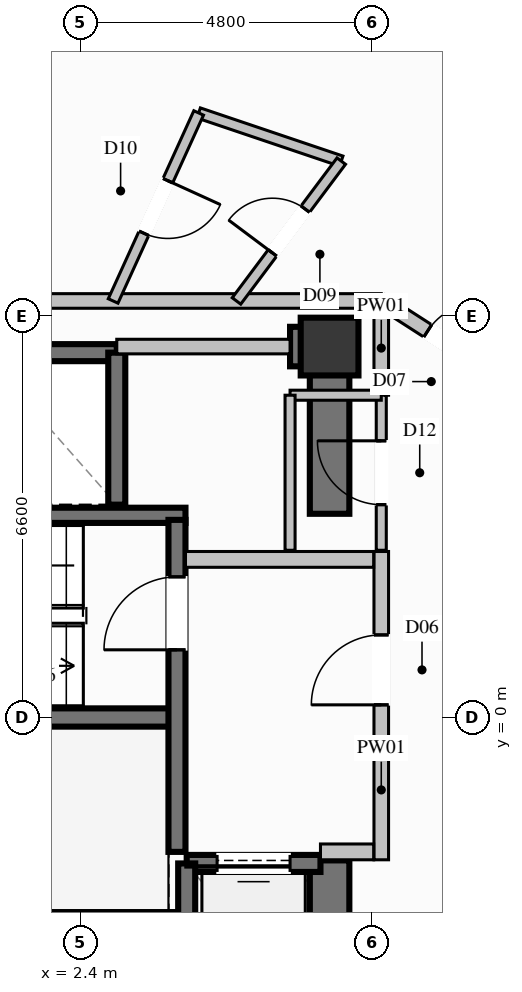
"""IFC4 building model, lengths in metres.
Left out: names, types, materials, properties, quantities, classifications, styles, units other than length and angle.
Written with IfcOpenShell. Run it as: python <this file> out.ifc"""

import sys

from ifc_helpers import new_model, si_unit, direction, frame, frame_2d, origin, origin_2d, place, context, subcontext, project, spatial, rectangle, extrude, element, fill, save


model = new_model("IFC4")
c1 = context("Model", 3, precision=1e-05, world=origin(), true_north=direction((0.0, 1.0)))
c2 = subcontext(c1, "Body", "Model", "MODEL_VIEW")
j1 = project(units=[si_unit("LENGTHUNIT", "METRE"), si_unit("PLANEANGLEUNIT", "RADIAN")], contexts=[c1])
p1 = place(None, origin())
s1 = spatial("IfcSite", under=j1, at=p1, CompositionType="ELEMENT")
p2 = place(p1, origin())
s2 = spatial("IfcBuilding", under=s1, at=p2, CompositionType="ELEMENT")
p3 = place(p2, frame((0.0, 0.0, 127.8)))
s3 = spatial("IfcBuildingStorey", under=s2, at=p3, CompositionType="ELEMENT", Elevation=127.8)
p4 = place(p3, frame((6.5, 6.1, 0.0), z_axis=(0.0, 0.0, 1.0), x_axis=(1.0, 0.0, 0.0)))
e1 = element("IfcColumn", 1, at=p4, inside=s3, PredefinedType="COLUMN", context=c2, shape_type="SweptSolid", body=[
    extrude(rectangle(XDim=0.95, YDim=0.95, at=origin_2d()), origin(), (0.0, 0.0, 1.0), 3.6),
])
p5 = place(p3, frame((-3.99, 0.0, 0.0), z_axis=(0.0, 0.0, 1.0), x_axis=(1.0, 0.0, 0.0)))
e2 = element("IfcWall", 2, at=p5, inside=s3, PredefinedType="SHEAR", context=c2, shape_type="SweptSolid", body=[
    extrude(rectangle(XDim=7.98, YDim=0.3, at=frame_2d((3.99, 0.0))), origin(), (0.0, 0.0, 1.0), 3.6),
])
for number, where, z_axis, x_axis in (
    (3, (-4.13, -3.325, 0.0), (0.0, 0.0, 1.0), (1.0, 0.0, 0.0)),
    (4, (-4.13, 3.325, 0.0), (0.0, 0.0, 1.0), (1.0, 0.0, 0.0)),
):
    element("IfcWall", number, at=place(p3, frame(where, z_axis=z_axis, x_axis=x_axis)), inside=s3, PredefinedType="SOLIDWALL", context=c2, shape_type="SweptSolid", body=[
        extrude(rectangle(XDim=8.26, YDim=0.25, at=frame_2d((4.13, 0.0))), origin(), (0.0, 0.0, 1.0), 3.6),
    ])
p6 = place(p3, frame((5.85, 6.1, 0.0), z_axis=(0.0, 0.0, 1.0), x_axis=(1.0, 0.0, 0.0)))
e5 = element("IfcWall", 5, at=p6, inside=s3, PredefinedType="SHEAR", context=c2, shape_type="SweptSolid", body=[
    extrude(rectangle(XDim=0.325, YDim=0.65, at=frame_2d((0.163, 0.0))), origin(), (0.0, 0.0, 1.0), 3.6),
])
p7 = place(p3, frame((6.5, -6.425, 0.0), z_axis=(0.0, 0.0, 1.0), x_axis=(0.0, 1.0, 0.0)))
e6 = element("IfcWall", 6, at=p7, inside=s3, PredefinedType="SHEAR", context=c2, shape_type="SweptSolid", body=[
    extrude(rectangle(XDim=4.075, YDim=0.65, at=frame_2d((2.038, 0.0))), origin(), (0.0, 0.0, 1.0), 3.6),
])
p8 = place(p3, frame((6.5, 3.35, 0.0), z_axis=(0.0, 0.0, 1.0), x_axis=(0.0, 1.0, 0.0)))
e7 = element("IfcWall", 7, at=p8, inside=s3, PredefinedType="SHEAR", context=c2, shape_type="SweptSolid", body=[
    extrude(rectangle(XDim=3.075, YDim=0.65, at=frame_2d((1.538, 0.0))), origin(), (0.0, 0.0, 1.0), 3.6),
])
p9 = place(p3, frame((3.0, 6.0, 0.0), z_axis=(0.0, 0.0, 1.0), x_axis=(-1.0, 0.0, 0.0)))
e8 = element("IfcWall", 8, at=p9, inside=s3, PredefinedType="SOLIDWALL", context=c2, shape_type="SweptSolid", body=[
    extrude(rectangle(XDim=2.2, YDim=0.28, at=frame_2d((1.1, 0.0))), origin(), (0.0, 0.0, 1.0), 3.35),
])
p10 = place(p3, frame((3.0, 3.5, 0.0), z_axis=(0.0, 0.0, 1.0), x_axis=(0.0, 1.0, 0.0)))
e9 = element("IfcWall", 9, at=p10, inside=s3, PredefinedType="SOLIDWALL", context=c2, shape_type="SweptSolid", body=[
    extrude(rectangle(XDim=2.5, YDim=0.28, at=frame_2d((1.25, 0.0))), origin(), (0.0, 0.0, 1.0), 3.35),
])
p11 = place(p3, frame((6.35, -2.4, 0.0), z_axis=(0.0, 0.0, 1.0), x_axis=(-1.0, 0.0, 0.0)))
e10 = element("IfcWall", 10, at=p11, inside=s3, PredefinedType="SOLIDWALL", context=c2, shape_type="SweptSolid", body=[
    extrude(rectangle(XDim=2.2, YDim=0.28, at=frame_2d((1.1, 0.0))), origin(), (0.0, 0.0, 1.0), 3.35),
])
p12 = place(p11, frame((0.5, 0.0, 0.0)))
e11 = element("IfcOpeningElement", 11, at=p12, cuts=e10, PredefinedType="OPENING", context=c2, shape_type="SweptSolid", body=[
    extrude(rectangle(XDim=1.2, YDim=2.2, at=frame_2d((0.6, 1.1))), frame((0.0, 0.15, 0.0), z_axis=(0.0, -1.0, 0.0), x_axis=(1.0, 0.0, 0.0)), (0.0, 0.0, 1.0), 0.3),
])
p13 = place(p3, frame((4.15, -2.4, 0.0), z_axis=(0.0, 0.0, 1.0), x_axis=(0.0, -1.0, 0.0)))
e12 = element("IfcWall", 12, at=p13, inside=s3, PredefinedType="SOLIDWALL", context=c2, shape_type="SweptSolid", body=[
    extrude(rectangle(XDim=2.7, YDim=0.28, at=frame_2d((1.35, 0.0))), origin(), (0.0, 0.0, 1.0), 3.35),
])
p14 = place(p3, frame((3.99, -2.21, 0.0), z_axis=(0.0, 0.0, 1.0), x_axis=(0.0, 1.0, 0.0)))
e13 = element("IfcWall", 13, at=p14, inside=s3, PredefinedType="SOLIDWALL", context=c2, shape_type="SweptSolid", body=[
    extrude(rectangle(XDim=5.46, YDim=0.28, at=frame_2d((2.73, 0.0))), origin(), (0.0, 0.0, 1.0), 3.35),
])
p15 = place(p14, frame((3.323, 0.0, 0.0)))
e14 = element("IfcOpeningElement", 14, at=p15, cuts=e13, PredefinedType="OPENING", context=c2, shape_type="SweptSolid", body=[
    extrude(rectangle(XDim=1.2, YDim=2.2, at=frame_2d((0.6, 1.1))), frame((0.0, 0.15, 0.0), z_axis=(0.0, -1.0, 0.0), x_axis=(1.0, 0.0, 0.0)), (0.0, 0.0, 1.0), 0.3),
])
p16 = place(p3, frame((7.35, -2.34, 0.0), z_axis=(0.0, 0.0, 1.0), x_axis=(0.0, 1.0, 0.0)))
e15 = element("IfcWall", 15, at=p16, inside=s3, PredefinedType="PARTITIONING", context=c2, shape_type="SweptSolid", body=[
    extrude(rectangle(XDim=5.07, YDim=0.24, at=frame_2d((2.535, 0.0))), origin(), (0.0, 0.0, 1.0), 2.435),
])
p17 = place(p16, frame((2.548, 0.0, 0.0)))
e16 = element("IfcOpeningElement", 16, at=p17, cuts=e15, PredefinedType="OPENING", context=c2, shape_type="SweptSolid", body=[
    extrude(rectangle(XDim=1.15, YDim=2.2, at=frame_2d((0.575, 1.1))), frame((0.0, 0.13, 0.0), z_axis=(0.0, -1.0, 0.0), x_axis=(1.0, 0.0, 0.0)), (0.0, 0.0, 1.0), 0.26),
])
p18 = place(p3, frame((6.35, -2.21, 0.0), z_axis=(0.0, 0.0, 1.0), x_axis=(1.0, 0.0, 0.0)))
e17 = element("IfcWall", 17, at=p18, inside=s3, PredefinedType="PARTITIONING", context=c2, shape_type="SweptSolid", body=[
    extrude(rectangle(XDim=0.875, YDim=0.26, at=frame_2d((0.438, 0.0))), origin(), (0.0, 0.0, 1.0), 3.35),
])
p19 = place(p3, frame((4.13, 2.6, 0.0), z_axis=(0.0, 0.0, 1.0), x_axis=(1.0, 0.0, 0.0)))
e18 = element("IfcWall", 18, at=p19, inside=s3, PredefinedType="PARTITIONING", context=c2, shape_type="SweptSolid", body=[
    extrude(rectangle(XDim=3.095, YDim=0.26, at=frame_2d((1.548, 0.0))), origin(), (0.0, 0.0, 1.0), 3.35),
])
p20 = place(p3, frame((-7.35, 6.85, 0.0), z_axis=(0.0, 0.0, 1.0), x_axis=(1.0, 0.0, 0.0)))
e19 = element("IfcWall", 19, at=p20, inside=s3, PredefinedType="PARTITIONING", context=c2, shape_type="SweptSolid", body=[
    extrude(rectangle(XDim=14.7, YDim=0.24, at=frame_2d((7.35, 0.0))), origin(), (0.0, 0.0, 1.0), 2.435),
])
p21 = place(p3, frame((7.35, 5.3, 0.0), z_axis=(0.0, 0.0, 1.0), x_axis=(0.0, 1.0, 0.0)))
e20 = element("IfcWall", 20, at=p21, inside=s3, PredefinedType="PARTITIONING", context=c2, shape_type="SweptSolid", body=[
    extrude(rectangle(XDim=1.55, YDim=0.24, at=frame_2d((0.775, 0.0))), origin(), (0.0, 0.0, 1.0), 2.435),
])
p22 = place(p3, frame((3.0, 6.1, 0.0), z_axis=(0.0, 0.0, 1.0), x_axis=(1.0, 0.0, 0.0)))
e21 = element("IfcWall", 21, at=p22, inside=s3, PredefinedType="PARTITIONING", context=c2, shape_type="SweptSolid", body=[
    extrude(rectangle(XDim=2.85, YDim=0.24, at=frame_2d((1.425, 0.0))), origin(), (0.0, 0.0, 1.0), 2.435),
])
p23 = place(p3, frame((7.35, 2.75, 0.0), z_axis=(0.0, 0.0, 1.0), x_axis=(0.0, 1.0, 0.0)))
e22 = element("IfcWall", 22, at=p23, inside=s3, PredefinedType="PARTITIONING", context=c2, shape_type="SweptSolid", body=[
    extrude(rectangle(XDim=2.55, YDim=0.165, at=frame_2d((1.275, 0.0))), origin(), (0.0, 0.0, 1.0), 3.35),
])
p24 = place(p23, frame((0.75, 0.0, 0.0)))
e23 = element("IfcOpeningElement", 23, at=p24, cuts=e22, PredefinedType="OPENING", context=c2, shape_type="SweptSolid", body=[
    extrude(rectangle(XDim=1.05, YDim=2.15, at=frame_2d((0.525, 1.075))), frame((0.0, 0.093, 0.0), z_axis=(0.0, -1.0, 0.0), x_axis=(1.0, 0.0, 0.0)), (0.0, 0.0, 1.0), 0.185),
])
p25 = place(p3, frame((7.35, 5.3, 0.0), z_axis=(0.0, 0.0, 1.0), x_axis=(-1.0, 0.0, 0.0)))
e24 = element("IfcWall", 24, at=p25, inside=s3, PredefinedType="PARTITIONING", context=c2, shape_type="SweptSolid", body=[
    extrude(rectangle(XDim=1.5, YDim=0.165, at=frame_2d((0.75, 0.0))), origin(), (0.0, 0.0, 1.0), 2.435),
])
p26 = place(p3, frame((5.85, 5.3, 0.0), z_axis=(0.0, 0.0, 1.0), x_axis=(0.0, -1.0, 0.0)))
e25 = element("IfcWall", 25, at=p26, inside=s3, PredefinedType="PARTITIONING", context=c2, shape_type="SweptSolid", body=[
    extrude(rectangle(XDim=2.55, YDim=0.165, at=frame_2d((1.275, 0.0))), origin(), (0.0, 0.0, 1.0), 2.435),
])
p27 = place(p3, frame((4.347, 9.942, 0.0), z_axis=(0.0, 0.0, 1.0), x_axis=(0.947423144853, -0.319983413004, 0.0)))
e26 = element("IfcWall", 26, at=p27, inside=s3, PredefinedType="PLUMBINGWALL", context=c2, shape_type="SweptSolid", body=[
    extrude(rectangle(XDim=2.475, YDim=0.175, at=frame_2d((1.238, 0.0))), origin(), (0.0, 0.0, 1.0), 3.35),
])
p28 = place(p3, frame((4.347, 9.942, 0.0), z_axis=(0.0, 0.0, 1.0), x_axis=(-0.414198201163, -0.910186711699, 0.0)))
e27 = element("IfcWall", 27, at=p28, inside=s3, PredefinedType="PLUMBINGWALL", context=c2, shape_type="SweptSolid", body=[
    extrude(rectangle(XDim=3.397, YDim=0.175, at=frame_2d((1.698, 0.0))), origin(), (0.0, 0.0, 1.0), 3.35),
])
p29 = place(p28, frame((1.224, 0.0, 0.0)))
e28 = element("IfcOpeningElement", 28, at=p29, cuts=e27, PredefinedType="OPENING", context=c2, shape_type="SweptSolid", body=[
    extrude(rectangle(XDim=0.95, YDim=2.1, at=frame_2d((0.475, 1.05))), frame((0.0, 0.098, 0.0), z_axis=(0.0, -1.0, 0.0), x_axis=(1.0, 0.0, 0.0)), (0.0, 0.0, 1.0), 0.195),
])
p30 = place(p3, frame((4.969, 6.85, 0.0), z_axis=(0.0, 0.0, 1.0), x_axis=(0.59956491451, 0.80032612933, 0.0)))
e29 = element("IfcWall", 29, at=p30, inside=s3, PredefinedType="PLUMBINGWALL", context=c2, shape_type="SweptSolid", body=[
    extrude(rectangle(XDim=2.874, YDim=0.175, at=frame_2d((1.437, 0.0))), origin(), (0.0, 0.0, 1.0), 2.717),
])
p31 = place(p30, frame((0.987, 0.0, 0.0)))
e30 = element("IfcOpeningElement", 30, at=p31, cuts=e29, PredefinedType="OPENING", context=c2, shape_type="SweptSolid", body=[
    extrude(rectangle(XDim=0.9, YDim=2.1, at=frame_2d((0.45, 1.05))), frame((0.0, 0.098, 0.0), z_axis=(0.0, -1.0, 0.0), x_axis=(1.0, 0.0, 0.0)), (0.0, 0.0, 1.0), 0.195),
])
p32 = place(p3, frame((7.35, 6.85, 0.0), z_axis=(0.0, 0.0, 1.0), x_axis=(0.840910978735, -0.541173471119, 0.0)))
e31 = element("IfcWall", 31, at=p32, inside=s3, PredefinedType="PARTITIONING", context=c2, shape_type="SweptSolid", body=[
    extrude(rectangle(XDim=2.818, YDim=0.24, at=frame_2d((1.409, 0.0))), origin(), (0.0, 0.0, 1.0), 3.35),
])
p33 = place(p32, frame((0.909, 0.0, 0.0)))
e32 = element("IfcOpeningElement", 32, at=p33, cuts=e31, PredefinedType="OPENING", context=c2, shape_type="SweptSolid", body=[
    extrude(rectangle(XDim=1.0, YDim=2.2, at=frame_2d((0.5, 1.1))), frame((0.0, 0.13, 0.0), z_axis=(0.0, -1.0, 0.0), x_axis=(1.0, 0.0, 0.0)), (0.0, 0.0, 1.0), 0.26),
])
p34 = place(p12, origin())
e33 = element("IfcDoor", 33, at=p34, inside=s3, OperationType="SLIDING_TO_LEFT", PredefinedType="DOOR", context=c2, shape_type="SweptSolid", body=[
    extrude(rectangle(XDim=1.2, YDim=2.2, at=frame_2d((0.6, 1.1))), frame((0.0, 0.025, 0.0), z_axis=(0.0, -1.0, 0.0), x_axis=(1.0, 0.0, 0.0)), (0.0, 0.0, 1.0), 0.05),
])
fill(e11, e33)
p35 = place(p15, origin())
e34 = element("IfcDoor", 34, at=p35, inside=s3, OperationType="SINGLE_SWING_LEFT", PredefinedType="DOOR", context=c2, shape_type="SweptSolid", body=[
    extrude(rectangle(XDim=1.2, YDim=2.2, at=frame_2d((0.6, 1.1))), frame((0.0, 0.025, 0.0), z_axis=(0.0, -1.0, 0.0), x_axis=(1.0, 0.0, 0.0)), (0.0, 0.0, 1.0), 0.05),
])
fill(e14, e34)
p36 = place(p17, origin())
e35 = element("IfcDoor", 35, at=p36, inside=s3, OperationType="SINGLE_SWING_LEFT", PredefinedType="DOOR", context=c2, shape_type="SweptSolid", body=[
    extrude(rectangle(XDim=1.15, YDim=2.2, at=frame_2d((0.575, 1.1))), frame((0.0, 0.025, 0.0), z_axis=(0.0, -1.0, 0.0), x_axis=(1.0, 0.0, 0.0)), (0.0, 0.0, 1.0), 0.05),
])
fill(e16, e35)
p37 = place(p24, origin())
e36 = element("IfcDoor", 36, at=p37, inside=s3, OperationType="SINGLE_SWING_RIGHT", PredefinedType="DOOR", context=c2, shape_type="SweptSolid", body=[
    extrude(rectangle(XDim=1.05, YDim=2.15, at=frame_2d((0.525, 1.075))), frame((0.0, 0.025, 0.0), z_axis=(0.0, -1.0, 0.0), x_axis=(1.0, 0.0, 0.0)), (0.0, 0.0, 1.0), 0.05),
])
fill(e23, e36)
p38 = place(p31, origin())
e37 = element("IfcDoor", 37, at=p38, inside=s3, OperationType="SINGLE_SWING_LEFT", PredefinedType="DOOR", context=c2, shape_type="SweptSolid", body=[
    extrude(rectangle(XDim=0.9, YDim=2.1, at=frame_2d((0.45, 1.05))), frame((0.0, 0.025, 0.0), z_axis=(0.0, -1.0, 0.0), x_axis=(1.0, 0.0, 0.0)), (0.0, 0.0, 1.0), 0.05),
])
fill(e30, e37)
p39 = place(p33, origin())
e38 = element("IfcDoor", 38, at=p39, inside=s3, OperationType="SINGLE_SWING_RIGHT", PredefinedType="DOOR", context=c2, shape_type="SweptSolid", body=[
    extrude(rectangle(XDim=1.0, YDim=2.2, at=frame_2d((0.5, 1.1))), frame((0.0, 0.025, 0.0), z_axis=(0.0, -1.0, 0.0), x_axis=(1.0, 0.0, 0.0)), (0.0, 0.0, 1.0), 0.05),
])
fill(e32, e38)
p40 = place(p29, origin())
e39 = element("IfcDoor", 39, at=p40, inside=s3, OperationType="SINGLE_SWING_LEFT", PredefinedType="DOOR", context=c2, shape_type="SweptSolid", body=[
    extrude(rectangle(XDim=0.95, YDim=2.1, at=frame_2d((0.475, 1.05))), frame((0.0, 0.025, 0.0), z_axis=(0.0, -1.0, 0.0), x_axis=(1.0, 0.0, 0.0)), (0.0, 0.0, 1.0), 0.05),
])
fill(e28, e39)
save(model, sys.argv[1])
